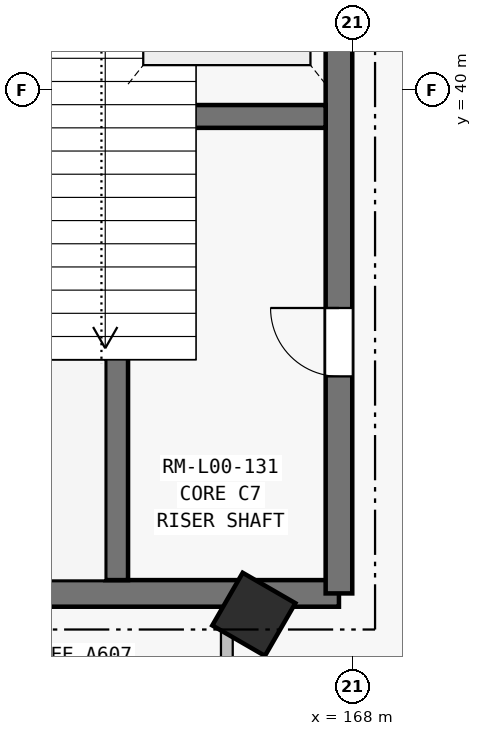
"""IFC4 building model, lengths in metres.
Left out: names, types, materials, properties, quantities, classifications, styles, units other than length and angle.
Written with IfcOpenShell. Run it as: python <this file> out.ifc"""

import sys

from ifc_helpers import new_model, si_unit, direction, frame, frame_2d, origin, origin_2d, place, context, subcontext, project, spatial, rectangle, extrude, element, fill, save


model = new_model("IFC4")
c1 = context("Model", 3, precision=1e-05, world=origin(), true_north=direction((0.0, 1.0)))
c2 = subcontext(c1, "Body", "Model", "MODEL_VIEW")
j1 = project(units=[si_unit("LENGTHUNIT", "METRE"), si_unit("PLANEANGLEUNIT", "RADIAN")], contexts=[c1])
p1 = place(None, origin())
s1 = spatial("IfcSite", under=j1, at=p1, CompositionType="ELEMENT")
p2 = place(p1, origin())
s2 = spatial("IfcBuilding", under=s1, at=p2, CompositionType="ELEMENT")
p3 = place(p2, origin())
s3 = spatial("IfcBuildingStorey", under=s2, at=p3, CompositionType="ELEMENT", Elevation=0.0)
p4 = place(p3, frame((166.705, 33.1, 0.0), z_axis=(0.0, 0.0, 1.0), x_axis=(0.866025403784, -0.5, 0.0)))
e1 = element("IfcColumn", 1, at=p4, inside=s3, PredefinedType="COLUMN", context=c2, shape_type="SweptSolid", body=[
    extrude(rectangle(XDim=0.8, YDim=0.8, at=origin_2d()), origin(), (0.0, 0.0, 1.0), 5.4),
])
p5 = place(p3, frame((159.775, 33.375, 0.0), z_axis=(0.0, 0.0, 1.0), x_axis=(1.0, 0.0, 0.0)))
e2 = element("IfcWall", 2, at=p5, inside=s3, PredefinedType="SHEAR", context=c2, shape_type="SweptSolid", body=[
    extrude(rectangle(XDim=8.05, YDim=0.35, at=frame_2d((4.025, 0.0))), origin(), (0.0, 0.0, 1.0), 5.4),
])
p6 = place(p3, frame((167.825, 33.375, 0.0), z_axis=(0.0, 0.0, 1.0), x_axis=(0.0, 1.0, 0.0)))
e3 = element("IfcWall", 3, at=p6, inside=s3, PredefinedType="SHEAR", context=c2, shape_type="SweptSolid", body=[
    extrude(rectangle(XDim=14.85, YDim=0.35, at=frame_2d((7.425, 0.0))), origin(), (0.0, 0.0, 1.0), 5.4),
])
p7 = place(p6, frame((2.855, 0.0, 0.0)))
e4 = element("IfcOpeningElement", 4, at=p7, cuts=e3, PredefinedType="OPENING", context=c2, shape_type="SweptSolid", body=[
    extrude(rectangle(XDim=0.9, YDim=2.1, at=frame_2d((0.45, 1.05))), frame((0.0, 0.185, 0.0), z_axis=(0.0, -1.0, 0.0), x_axis=(1.0, 0.0, 0.0)), (0.0, 0.0, 1.0), 0.37),
])
p8 = place(p3, frame((164.9, 33.55, 0.0), z_axis=(0.0, 0.0, 1.0), x_axis=(0.0, 1.0, 0.0)))
e5 = element("IfcWall", 5, at=p8, inside=s3, PredefinedType="SHEAR", context=c2, shape_type="SweptSolid", body=[
    extrude(rectangle(XDim=10.35, YDim=0.3, at=frame_2d((5.175, 0.0))), origin(), (0.0, 0.0, 1.0), 5.4),
])
p9 = place(p3, frame((165.05, 39.65, 0.0), z_axis=(0.0, 0.0, 1.0), x_axis=(1.0, 0.0, 0.0)))
e6 = element("IfcWall", 6, at=p9, inside=s3, PredefinedType="SHEAR", context=c2, shape_type="SweptSolid", body=[
    extrude(rectangle(XDim=2.6, YDim=0.3, at=frame_2d((1.3, 0.0))), origin(), (0.0, 0.0, 1.0), 5.4),
])
p10 = place(p3, frame((166.35, 32.875, 0.0), z_axis=(0.0, 0.0, 1.0), x_axis=(0.0, -1.0, 0.0)))
e7 = element("IfcWall", 7, at=p10, inside=s3, PredefinedType="PARTITIONING", context=c2, shape_type="SweptSolid", body=[
    extrude(rectangle(XDim=3.795, YDim=0.155, at=frame_2d((1.897, 0.0))), origin(), (0.0, 0.0, 1.0), 5.12),
])
p11 = place(p7, origin())
e8 = element("IfcDoor", 8, at=p11, inside=s3, OperationType="SINGLE_SWING_RIGHT", PredefinedType="DOOR", context=c2, shape_type="SweptSolid", body=[
    extrude(rectangle(XDim=0.9, YDim=2.1, at=frame_2d((0.45, 1.05))), frame((0.0, 0.025, 0.0), z_axis=(0.0, -1.0, 0.0), x_axis=(1.0, 0.0, 0.0)), (0.0, 0.0, 1.0), 0.05),
])
fill(e4, e8)
save(model, sys.argv[1])
